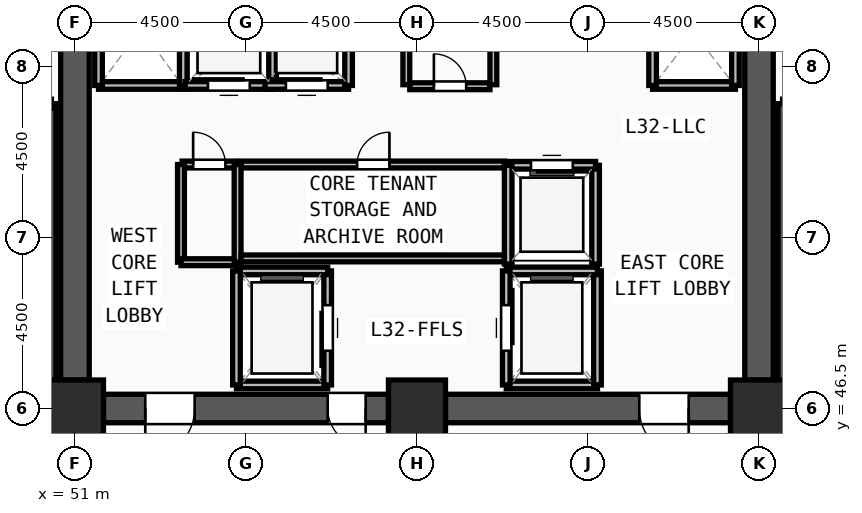
"""IFC4 building model, lengths in metres.
Left out: names, types, materials, properties, quantities, classifications, styles, units other than length and angle.
Written with IfcOpenShell. Run it as: python <this file> out.ifc"""

import sys

from ifc_helpers import new_model, si_unit, direction, frame, frame_2d, origin, origin_2d, place, context, subcontext, project, spatial, rectangle, extrude, source, transform, mapped, element, fill, save


model = new_model("IFC4")
c1 = context("Model", 3, precision=1e-05, world=origin(), true_north=direction((0.0, 1.0)))
c2 = subcontext(c1, "Body", "Model", "MODEL_VIEW")
j1 = project(units=[si_unit("LENGTHUNIT", "METRE"), si_unit("PLANEANGLEUNIT", "RADIAN")], contexts=[c1])
p1 = place(None, origin())
s1 = spatial("IfcSite", under=j1, at=p1, CompositionType="ELEMENT")
p2 = place(p1, origin())
s2 = spatial("IfcBuilding", under=s1, at=p2, CompositionType="ELEMENT")
p3 = place(p2, frame((0.0, 0.0, 124.5)))
s3 = spatial("IfcBuildingStorey", under=s2, at=p3, CompositionType="ELEMENT", Elevation=124.5)
m1 = source(origin(), c2, "Body", "SweptSolid", [
    extrude(rectangle(XDim=1.5, YDim=1.5, at=origin_2d()), origin(), (0.0, 0.0, 1.0), 3.75),
])
for number, where, z_axis, x_axis in (
    (1, (51.0, 46.5, 0.0), (0.0, 0.0, 1.0), (1.0, 0.0, 0.0)),
    (2, (60.0, 46.5, 0.0), (0.0, 0.0, 1.0), (1.0, 0.0, 0.0)),
    (3, (69.0, 46.5, 0.0), (0.0, 0.0, 1.0), (1.0, 0.0, 0.0)),
):
    element("IfcColumn", number, at=place(p3, frame(where, z_axis=z_axis, x_axis=x_axis)), inside=s3, PredefinedType="COLUMN", context=c2, shape_type="MappedRepresentation", body=[
        mapped(m1, transform((0.0, 0.0, 0.0), x_axis=(1.0, 0.0, 0.0), y_axis=(0.0, 1.0, 0.0), z_axis=(0.0, 0.0, 1.0), scale=1.0)),
    ])
p4 = place(p3, frame((69.0, 60.75, 0.0), z_axis=(0.0, 0.0, 1.0), x_axis=(0.0, -1.0, 0.0)))
e4 = element("IfcWall", 4, at=p4, inside=s3, PredefinedType="SHEAR", context=c2, shape_type="SweptSolid", body=[
    extrude(rectangle(XDim=13.5, YDim=0.75, at=frame_2d((6.75, 0.0))), origin(), (0.0, 0.0, 1.0), 3.57),
])
m2 = source(origin(), c2, "Body", "SweptSolid", [
    extrude(rectangle(XDim=1.2, YDim=2.2, at=frame_2d((0.6, 1.1))), frame((0.0, 0.385, 0.0), z_axis=(0.0, -1.0, 0.0), x_axis=(1.0, 0.0, 0.0)), (0.0, 0.0, 1.0), 0.77),
])
p5 = place(p4, frame((1.2, 0.0, 0.0)))
e5 = element("IfcOpeningElement", 5, at=p5, cuts=e4, PredefinedType="OPENING", context=c2, shape_type="MappedRepresentation", body=[
    mapped(m2, transform((0.0, 0.0, 0.0), x_axis=(1.0, 0.0, 0.0), y_axis=(0.0, 1.0, 0.0), z_axis=(0.0, 0.0, 1.0), scale=1.0)),
])
p6 = place(p3, frame((68.25, 46.5, 0.0), z_axis=(0.0, 0.0, 1.0), x_axis=(-1.0, 0.0, 0.0)))
e6 = element("IfcWall", 6, at=p6, inside=s3, PredefinedType="SHEAR", context=c2, shape_type="SweptSolid", body=[
    extrude(rectangle(XDim=7.5, YDim=0.75, at=frame_2d((3.75, 0.0))), origin(), (0.0, 0.0, 1.0), 3.57),
])
m3 = source(origin(), c2, "Body", "SweptSolid", [
    extrude(rectangle(XDim=1.3, YDim=2.2, at=frame_2d((0.65, 1.1))), frame((0.0, 0.385, 0.0), z_axis=(0.0, -1.0, 0.0), x_axis=(1.0, 0.0, 0.0)), (0.0, 0.0, 1.0), 0.77),
])
p7 = place(p6, frame((1.1, 0.0, 0.0)))
e7 = element("IfcOpeningElement", 7, at=p7, cuts=e6, PredefinedType="OPENING", context=c2, shape_type="MappedRepresentation", body=[
    mapped(m3, transform((0.0, 0.0, 0.0), x_axis=(1.0, 0.0, 0.0), y_axis=(0.0, 1.0, 0.0), z_axis=(0.0, 0.0, 1.0), scale=1.0)),
])
p8 = place(p3, frame((59.25, 46.5, 0.0), z_axis=(0.0, 0.0, 1.0), x_axis=(-1.0, 0.0, 0.0)))
e8 = element("IfcWall", 8, at=p8, inside=s3, PredefinedType="SHEAR", context=c2, shape_type="SweptSolid", body=[
    extrude(rectangle(XDim=7.5, YDim=0.75, at=frame_2d((3.75, 0.0))), origin(), (0.0, 0.0, 1.0), 3.57),
])
p9 = place(p8, frame((5.1, 0.0, 0.0)))
e9 = element("IfcOpeningElement", 9, at=p9, cuts=e8, PredefinedType="OPENING", context=c2, shape_type="MappedRepresentation", body=[
    mapped(m3, transform((0.0, 0.0, 0.0), x_axis=(1.0, 0.0, 0.0), y_axis=(0.0, 1.0, 0.0), z_axis=(0.0, 0.0, 1.0), scale=1.0)),
])
m4 = source(origin(), c2, "Body", "SweptSolid", [
    extrude(rectangle(XDim=1.0, YDim=2.2, at=frame_2d((0.5, 1.1))), frame((0.0, 0.385, 0.0), z_axis=(0.0, -1.0, 0.0), x_axis=(1.0, 0.0, 0.0)), (0.0, 0.0, 1.0), 0.77),
])
p10 = place(p8, frame((0.6, 0.0, 0.0)))
e10 = element("IfcOpeningElement", 10, at=p10, cuts=e8, PredefinedType="OPENING", context=c2, shape_type="MappedRepresentation", body=[
    mapped(m4, transform((0.0, 0.0, 0.0), x_axis=(1.0, 0.0, 0.0), y_axis=(0.0, 1.0, 0.0), z_axis=(0.0, 0.0, 1.0), scale=1.0)),
])
p11 = place(p3, frame((51.0, 47.25, 0.0), z_axis=(0.0, 0.0, 1.0), x_axis=(0.0, 1.0, 0.0)))
e11 = element("IfcWall", 11, at=p11, inside=s3, PredefinedType="SHEAR", context=c2, shape_type="SweptSolid", body=[
    extrude(rectangle(XDim=13.5, YDim=0.75, at=frame_2d((6.75, 0.0))), origin(), (0.0, 0.0, 1.0), 3.57),
])
for number, where, z_axis, x_axis in (
    (12, (50.38, 46.7, 0.0), (0.0, 0.0, 1.0), (0.0, 1.0, 0.0)),
    (13, (69.62, 54.52, 0.0), (0.0, 0.0, 1.0), (0.0, -1.0, 0.0)),
):
    element("IfcWall", number, at=place(p3, frame(where, z_axis=z_axis, x_axis=x_axis)), inside=s3, PredefinedType="SOLIDWALL", context=c2, shape_type="SweptSolid", body=[
        extrude(rectangle(XDim=7.82, YDim=0.24, at=frame_2d((3.91, 0.0))), origin(), (0.0, 0.0, 1.0), 3.57),
    ])
p12 = place(p3, frame((55.25, 47.12, 0.0), z_axis=(0.0, 0.0, 1.0), x_axis=(1.0, 0.0, 0.0)))
e14 = element("IfcWall", 14, at=p12, inside=s3, PredefinedType="SOLIDWALL", context=c2, shape_type="SweptSolid", body=[
    extrude(rectangle(XDim=2.4, YDim=0.2, at=frame_2d((1.2, 0.0))), origin(), (0.0, 0.0, 1.0), 3.57),
])
p13 = place(p3, frame((57.65, 47.12, 0.0), z_axis=(0.0, 0.0, 1.0), x_axis=(0.0, 1.0, 0.0)))
e15 = element("IfcWall", 15, at=p13, inside=s3, PredefinedType="SOLIDWALL", context=c2, shape_type="SweptSolid", body=[
    extrude(rectangle(XDim=3.0, YDim=0.2, at=frame_2d((1.5, 0.0))), origin(), (0.0, 0.0, 1.0), 3.57),
])
m5 = source(origin(), c2, "Body", "SweptSolid", [
    extrude(rectangle(XDim=1.2, YDim=2.3, at=frame_2d((0.6, 1.15))), frame((0.0, 0.11, 0.0), z_axis=(0.0, -1.0, 0.0), x_axis=(1.0, 0.0, 0.0)), (0.0, 0.0, 1.0), 0.22),
])
p14 = place(p13, frame((0.9, 0.0, 0.0)))
e16 = element("IfcOpeningElement", 16, at=p14, cuts=e15, PredefinedType="OPENING", context=c2, shape_type="MappedRepresentation", body=[
    mapped(m5, transform((0.0, 0.0, 0.0), x_axis=(1.0, 0.0, 0.0), y_axis=(0.0, 1.0, 0.0), z_axis=(0.0, 0.0, 1.0), scale=1.0)),
])
p15 = place(p3, frame((57.65, 50.12, 0.0), z_axis=(0.0, 0.0, 1.0), x_axis=(-1.0, 0.0, 0.0)))
e17 = element("IfcWall", 17, at=p15, inside=s3, PredefinedType="SOLIDWALL", context=c2, shape_type="SweptSolid", body=[
    extrude(rectangle(XDim=2.4, YDim=0.2, at=frame_2d((1.2, 0.0))), origin(), (0.0, 0.0, 1.0), 3.57),
])
p16 = place(p3, frame((55.25, 50.12, 0.0), z_axis=(0.0, 0.0, 1.0), x_axis=(0.0, -1.0, 0.0)))
e18 = element("IfcWall", 18, at=p16, inside=s3, PredefinedType="SOLIDWALL", context=c2, shape_type="SweptSolid", body=[
    extrude(rectangle(XDim=3.0, YDim=0.2, at=frame_2d((1.5, 0.0))), origin(), (0.0, 0.0, 1.0), 3.57),
])
p17 = place(p3, frame((62.35, 47.12, 0.0), z_axis=(0.0, 0.0, 1.0), x_axis=(1.0, 0.0, 0.0)))
e19 = element("IfcWall", 19, at=p17, inside=s3, PredefinedType="SOLIDWALL", context=c2, shape_type="SweptSolid", body=[
    extrude(rectangle(XDim=2.4, YDim=0.2, at=frame_2d((1.2, 0.0))), origin(), (0.0, 0.0, 1.0), 3.57),
])
p18 = place(p3, frame((64.75, 47.12, 0.0), z_axis=(0.0, 0.0, 1.0), x_axis=(0.0, 1.0, 0.0)))
e20 = element("IfcWall", 20, at=p18, inside=s3, PredefinedType="SOLIDWALL", context=c2, shape_type="SweptSolid", body=[
    extrude(rectangle(XDim=3.0, YDim=0.2, at=frame_2d((1.5, 0.0))), origin(), (0.0, 0.0, 1.0), 3.57),
])
p19 = place(p3, frame((64.75, 50.12, 0.0), z_axis=(0.0, 0.0, 1.0), x_axis=(-1.0, 0.0, 0.0)))
e21 = element("IfcWall", 21, at=p19, inside=s3, PredefinedType="SOLIDWALL", context=c2, shape_type="SweptSolid", body=[
    extrude(rectangle(XDim=2.4, YDim=0.2, at=frame_2d((1.2, 0.0))), origin(), (0.0, 0.0, 1.0), 3.57),
])
p20 = place(p3, frame((62.35, 50.12, 0.0), z_axis=(0.0, 0.0, 1.0), x_axis=(0.0, -1.0, 0.0)))
e22 = element("IfcWall", 22, at=p20, inside=s3, PredefinedType="SOLIDWALL", context=c2, shape_type="SweptSolid", body=[
    extrude(rectangle(XDim=3.0, YDim=0.2, at=frame_2d((1.5, 0.0))), origin(), (0.0, 0.0, 1.0), 3.57),
])
p21 = place(p20, frame((0.9, 0.0, 0.0)))
e23 = element("IfcOpeningElement", 23, at=p21, cuts=e22, PredefinedType="OPENING", context=c2, shape_type="MappedRepresentation", body=[
    mapped(m5, transform((0.0, 0.0, 0.0), x_axis=(1.0, 0.0, 0.0), y_axis=(0.0, 1.0, 0.0), z_axis=(0.0, 0.0, 1.0), scale=1.0)),
])
p22 = place(p3, frame((51.62, 55.0, 0.0), z_axis=(0.0, 0.0, 1.0), x_axis=(1.0, 0.0, 0.0)))
e24 = element("IfcWall", 24, at=p22, inside=s3, PredefinedType="SOLIDWALL", context=c2, shape_type="SweptSolid", body=[
    extrude(rectangle(XDim=2.23, YDim=0.2, at=frame_2d((1.115, 0.0))), origin(), (0.0, 0.0, 1.0), 3.57),
])
for number, where, z_axis, x_axis in (
    (25, (53.85, 55.0, 0.0), (0.0, 0.0, 1.0), (0.0, 1.0, 0.0)),
    (26, (51.62, 58.0, 0.0), (0.0, 0.0, 1.0), (0.0, -1.0, 0.0)),
):
    element("IfcWall", number, at=place(p3, frame(where, z_axis=z_axis, x_axis=x_axis)), inside=s3, PredefinedType="SOLIDWALL", context=c2, shape_type="SweptSolid", body=[
        extrude(rectangle(XDim=3.0, YDim=0.2, at=frame_2d((1.5, 0.0))), origin(), (0.0, 0.0, 1.0), 3.57),
    ])
p23 = place(p3, frame((66.2, 55.0, 0.0), z_axis=(0.0, 0.0, 1.0), x_axis=(1.0, 0.0, 0.0)))
e27 = element("IfcWall", 27, at=p23, inside=s3, PredefinedType="SOLIDWALL", context=c2, shape_type="SweptSolid", body=[
    extrude(rectangle(XDim=2.18, YDim=0.2, at=frame_2d((1.09, 0.0))), origin(), (0.0, 0.0, 1.0), 3.57),
])
for number, where, z_axis, x_axis in (
    (28, (68.38, 55.0, 0.0), (0.0, 0.0, 1.0), (0.0, 1.0, 0.0)),
    (29, (66.2, 57.75, 0.0), (0.0, 0.0, 1.0), (0.0, -1.0, 0.0)),
):
    element("IfcWall", number, at=place(p3, frame(where, z_axis=z_axis, x_axis=x_axis)), inside=s3, PredefinedType="SOLIDWALL", context=c2, shape_type="SweptSolid", body=[
        extrude(rectangle(XDim=2.75, YDim=0.2, at=frame_2d((1.375, 0.0))), origin(), (0.0, 0.0, 1.0), 3.57),
    ])
p24 = place(p3, frame((64.7, 50.3, 0.0), z_axis=(0.0, 0.0, 1.0), x_axis=(0.0, 1.0, 0.0)))
e30 = element("IfcWall", 30, at=p24, inside=s3, PredefinedType="SOLIDWALL", context=c2, shape_type="SweptSolid", body=[
    extrude(rectangle(XDim=2.6, YDim=0.2, at=frame_2d((1.3, 0.0))), origin(), (0.0, 0.0, 1.0), 3.57),
])
p25 = place(p3, frame((64.7, 52.9, 0.0), z_axis=(0.0, 0.0, 1.0), x_axis=(-1.0, 0.0, 0.0)))
e31 = element("IfcWall", 31, at=p25, inside=s3, PredefinedType="SOLIDWALL", context=c2, shape_type="SweptSolid", body=[
    extrude(rectangle(XDim=2.3, YDim=0.2, at=frame_2d((1.15, 0.0))), origin(), (0.0, 0.0, 1.0), 3.57),
])
m6 = source(origin(), c2, "Body", "SweptSolid", [
    extrude(rectangle(XDim=1.1, YDim=2.2, at=frame_2d((0.55, 1.1))), frame((0.0, 0.11, 0.0), z_axis=(0.0, -1.0, 0.0), x_axis=(1.0, 0.0, 0.0)), (0.0, 0.0, 1.0), 0.22),
])
p26 = place(p25, frame((0.6, 0.0, 0.0)))
e32 = element("IfcOpeningElement", 32, at=p26, cuts=e31, PredefinedType="OPENING", context=c2, shape_type="MappedRepresentation", body=[
    mapped(m6, transform((0.0, 0.0, 0.0), x_axis=(1.0, 0.0, 0.0), y_axis=(0.0, 1.0, 0.0), z_axis=(0.0, 0.0, 1.0), scale=1.0)),
])
p27 = place(p3, frame((62.4, 52.9, 0.0), z_axis=(0.0, 0.0, 1.0), x_axis=(0.0, -1.0, 0.0)))
e33 = element("IfcWall", 33, at=p27, inside=s3, PredefinedType="SOLIDWALL", context=c2, shape_type="SweptSolid", body=[
    extrude(rectangle(XDim=2.6, YDim=0.2, at=frame_2d((1.3, 0.0))), origin(), (0.0, 0.0, 1.0), 3.57),
])
p28 = place(p3, frame((53.9, 55.0, 0.0), z_axis=(0.0, 0.0, 1.0), x_axis=(1.0, 0.0, 0.0)))
e34 = element("IfcWall", 34, at=p28, inside=s3, PredefinedType="SOLIDWALL", context=c2, shape_type="SweptSolid", body=[
    extrude(rectangle(XDim=2.3, YDim=0.2, at=frame_2d((1.15, 0.0))), origin(), (0.0, 0.0, 1.0), 3.57),
])
p29 = place(p28, frame((0.6, 0.0, 0.0)))
e35 = element("IfcOpeningElement", 35, at=p29, cuts=e34, PredefinedType="OPENING", context=c2, shape_type="MappedRepresentation", body=[
    mapped(m6, transform((0.0, 0.0, 0.0), x_axis=(1.0, 0.0, 0.0), y_axis=(0.0, 1.0, 0.0), z_axis=(0.0, 0.0, 1.0), scale=1.0)),
])
p30 = place(p3, frame((56.2, 55.0, 0.0), z_axis=(0.0, 0.0, 1.0), x_axis=(0.0, 1.0, 0.0)))
e36 = element("IfcWall", 36, at=p30, inside=s3, PredefinedType="SOLIDWALL", context=c2, shape_type="SweptSolid", body=[
    extrude(rectangle(XDim=2.6, YDim=0.2, at=frame_2d((1.3, 0.0))), origin(), (0.0, 0.0, 1.0), 3.57),
])
p31 = place(p3, frame((56.0, 55.0, 0.0), z_axis=(0.0, 0.0, 1.0), x_axis=(1.0, 0.0, 0.0)))
e37 = element("IfcWall", 37, at=p31, inside=s3, PredefinedType="SOLIDWALL", context=c2, shape_type="SweptSolid", body=[
    extrude(rectangle(XDim=2.2, YDim=0.2, at=frame_2d((1.1, 0.0))), origin(), (0.0, 0.0, 1.0), 3.57),
])
p32 = place(p31, frame((0.55, 0.0, 0.0)))
e38 = element("IfcOpeningElement", 38, at=p32, cuts=e37, PredefinedType="OPENING", context=c2, shape_type="MappedRepresentation", body=[
    mapped(m6, transform((0.0, 0.0, 0.0), x_axis=(1.0, 0.0, 0.0), y_axis=(0.0, 1.0, 0.0), z_axis=(0.0, 0.0, 1.0), scale=1.0)),
])
p33 = place(p3, frame((58.2, 55.0, 0.0), z_axis=(0.0, 0.0, 1.0), x_axis=(0.0, 1.0, 0.0)))
e39 = element("IfcWall", 39, at=p33, inside=s3, PredefinedType="SOLIDWALL", context=c2, shape_type="SweptSolid", body=[
    extrude(rectangle(XDim=2.6, YDim=0.2, at=frame_2d((1.3, 0.0))), origin(), (0.0, 0.0, 1.0), 3.57),
])
p34 = place(p3, frame((55.37, 52.92, 0.0), z_axis=(0.0, 0.0, 1.0), x_axis=(1.0, 0.0, 0.0)))
e40 = element("IfcWall", 40, at=p34, inside=s3, PredefinedType="PARTITIONING", context=c2, shape_type="SweptSolid", body=[
    extrude(rectangle(XDim=6.93, YDim=0.18, at=frame_2d((3.465, 0.0))), origin(), (0.0, 0.0, 1.0), 3.57),
])
m7 = source(origin(), c2, "Body", "SweptSolid", [
    extrude(rectangle(XDim=0.85, YDim=2.1, at=frame_2d((0.425, 1.05))), frame((0.0, 0.1, 0.0), z_axis=(0.0, -1.0, 0.0), x_axis=(1.0, 0.0, 0.0)), (0.0, 0.0, 1.0), 0.2),
])
p35 = place(p34, frame((3.055, 0.0, 0.0)))
e41 = element("IfcOpeningElement", 41, at=p35, cuts=e40, PredefinedType="OPENING", context=c2, shape_type="MappedRepresentation", body=[
    mapped(m7, transform((0.0, 0.0, 0.0), x_axis=(1.0, 0.0, 0.0), y_axis=(0.0, 1.0, 0.0), z_axis=(0.0, 0.0, 1.0), scale=1.0)),
])
p36 = place(p3, frame((59.81, 54.98, 0.0), z_axis=(0.0, 0.0, 1.0), x_axis=(1.0, 0.0, 0.0)))
e42 = element("IfcWall", 42, at=p36, inside=s3, PredefinedType="PARTITIONING", context=c2, shape_type="SweptSolid", body=[
    extrude(rectangle(XDim=2.11, YDim=0.18, at=frame_2d((1.055, 0.0))), origin(), (0.0, 0.0, 1.0), 3.57),
])
p37 = place(p36, frame((0.635, 0.0, 0.0)))
e43 = element("IfcOpeningElement", 43, at=p37, cuts=e42, PredefinedType="OPENING", context=c2, shape_type="MappedRepresentation", body=[
    mapped(m7, transform((0.0, 0.0, 0.0), x_axis=(1.0, 0.0, 0.0), y_axis=(0.0, 1.0, 0.0), z_axis=(0.0, 0.0, 1.0), scale=1.0)),
])
p38 = place(p3, frame((53.82, 52.92, 0.0), z_axis=(0.0, 0.0, 1.0), x_axis=(1.0, 0.0, 0.0)))
e44 = element("IfcWall", 44, at=p38, inside=s3, PredefinedType="PARTITIONING", context=c2, shape_type="SweptSolid", body=[
    extrude(rectangle(XDim=1.43, YDim=0.18, at=frame_2d((0.715, 0.0))), origin(), (0.0, 0.0, 1.0), 3.57),
])
p39 = place(p38, frame((0.29, 0.0, 0.0)))
e45 = element("IfcOpeningElement", 45, at=p39, cuts=e44, PredefinedType="OPENING", context=c2, shape_type="MappedRepresentation", body=[
    mapped(m7, transform((0.0, 0.0, 0.0), x_axis=(1.0, 0.0, 0.0), y_axis=(0.0, 1.0, 0.0), z_axis=(0.0, 0.0, 1.0), scale=1.0)),
])
for number, where, z_axis, x_axis in (
    (46, (59.72, 55.02, 0.0), (0.0, 0.0, 1.0), (0.0, 1.0, 0.0)),
    (47, (62.01, 55.02, 0.0), (0.0, 0.0, 1.0), (0.0, 1.0, 0.0)),
):
    element("IfcWall", number, at=place(p3, frame(where, z_axis=z_axis, x_axis=x_axis)), inside=s3, PredefinedType="PARTITIONING", context=c2, shape_type="SweptSolid", body=[
        extrude(rectangle(XDim=2.88, YDim=0.18, at=frame_2d((1.44, 0.0))), origin(), (0.0, 0.0, 1.0), 3.57),
    ])
p40 = place(p3, frame((53.79, 50.35, 0.0), z_axis=(0.0, 0.0, 1.0), x_axis=(0.0, 1.0, 0.0)))
e48 = element("IfcWall", 48, at=p40, inside=s3, PredefinedType="PARTITIONING", context=c2, shape_type="SweptSolid", body=[
    extrude(rectangle(XDim=2.57, YDim=0.18, at=frame_2d((1.285, 0.0))), origin(), (0.0, 0.0, 1.0), 3.57),
])
p41 = place(p3, frame((53.79, 50.35, 0.0), z_axis=(0.0, 0.0, 1.0), x_axis=(1.0, 0.0, 0.0)))
e49 = element("IfcWall", 49, at=p41, inside=s3, PredefinedType="PARTITIONING", context=c2, shape_type="SweptSolid", body=[
    extrude(rectangle(XDim=1.49, YDim=0.18, at=frame_2d((0.745, 0.0))), origin(), (0.0, 0.0, 1.0), 3.57),
])
p42 = place(p3, frame((55.28, 50.35, 0.0), z_axis=(0.0, 0.0, 1.0), x_axis=(0.0, 1.0, 0.0)))
e50 = element("IfcWall", 50, at=p42, inside=s3, PredefinedType="PARTITIONING", context=c2, shape_type="SweptSolid", body=[
    extrude(rectangle(XDim=2.57, YDim=0.18, at=frame_2d((1.285, 0.0))), origin(), (0.0, 0.0, 1.0), 3.57),
])
p43 = place(p3, frame((55.37, 50.45, 0.0), z_axis=(0.0, 0.0, 1.0), x_axis=(1.0, 0.0, 0.0)))
e51 = element("IfcWall", 51, at=p43, inside=s3, PredefinedType="PARTITIONING", context=c2, shape_type="SweptSolid", body=[
    extrude(rectangle(XDim=6.93, YDim=0.18, at=frame_2d((3.465, 0.0))), origin(), (0.0, 0.0, 1.0), 3.57),
])
m8 = source(origin(), c2, "Body", "SweptSolid", [
    extrude(rectangle(XDim=1.3, YDim=2.2, at=frame_2d((0.65, 1.1))), frame((0.0, 0.025, 0.0), z_axis=(0.0, -1.0, 0.0), x_axis=(1.0, 0.0, 0.0)), (0.0, 0.0, 1.0), 0.05),
])
p44 = place(p9, origin())
e52 = element("IfcDoor", 52, at=p44, inside=s3, OperationType="SINGLE_SWING_RIGHT", PredefinedType="DOOR", context=c2, shape_type="MappedRepresentation", body=[
    mapped(m8, transform((0.0, 0.0, 0.0), x_axis=(1.0, 0.0, 0.0), y_axis=(0.0, 1.0, 0.0), z_axis=(0.0, 0.0, 1.0), scale=1.0)),
])
fill(e9, e52)
m9 = source(origin(), c2, "Body", "SweptSolid", [
    extrude(rectangle(XDim=1.0, YDim=2.2, at=frame_2d((0.5, 1.1))), frame((0.0, 0.025, 0.0), z_axis=(0.0, -1.0, 0.0), x_axis=(1.0, 0.0, 0.0)), (0.0, 0.0, 1.0), 0.05),
])
p45 = place(p10, origin())
e53 = element("IfcDoor", 53, at=p45, inside=s3, OperationType="SINGLE_SWING_LEFT", PredefinedType="DOOR", context=c2, shape_type="MappedRepresentation", body=[
    mapped(m9, transform((0.0, 0.0, 0.0), x_axis=(1.0, 0.0, 0.0), y_axis=(0.0, 1.0, 0.0), z_axis=(0.0, 0.0, 1.0), scale=1.0)),
])
fill(e10, e53)
p46 = place(p7, origin())
e54 = element("IfcDoor", 54, at=p46, inside=s3, OperationType="SINGLE_SWING_LEFT", PredefinedType="DOOR", context=c2, shape_type="MappedRepresentation", body=[
    mapped(m8, transform((0.0, 0.0, 0.0), x_axis=(1.0, 0.0, 0.0), y_axis=(0.0, 1.0, 0.0), z_axis=(0.0, 0.0, 1.0), scale=1.0)),
])
fill(e7, e54)
m10 = source(origin(), c2, "Body", "SweptSolid", [
    extrude(rectangle(XDim=1.2, YDim=2.3, at=frame_2d((0.6, 1.15))), frame((0.0, 0.025, 0.0), z_axis=(0.0, -1.0, 0.0), x_axis=(1.0, 0.0, 0.0)), (0.0, 0.0, 1.0), 0.05),
])
p47 = place(p14, origin())
e55 = element("IfcDoor", 55, at=p47, inside=s3, OperationType="SLIDING_TO_LEFT", PredefinedType="DOOR", context=c2, shape_type="MappedRepresentation", body=[
    mapped(m10, transform((0.0, 0.0, 0.0), x_axis=(1.0, 0.0, 0.0), y_axis=(0.0, 1.0, 0.0), z_axis=(0.0, 0.0, 1.0), scale=1.0)),
])
fill(e16, e55)
p48 = place(p21, origin())
e56 = element("IfcDoor", 56, at=p48, inside=s3, OperationType="SLIDING_TO_LEFT", PredefinedType="DOOR", context=c2, shape_type="MappedRepresentation", body=[
    mapped(m10, transform((0.0, 0.0, 0.0), x_axis=(1.0, 0.0, 0.0), y_axis=(0.0, 1.0, 0.0), z_axis=(0.0, 0.0, 1.0), scale=1.0)),
])
fill(e23, e56)
m11 = source(origin(), c2, "Body", "SweptSolid", [
    extrude(rectangle(XDim=1.1, YDim=2.2, at=frame_2d((0.55, 1.1))), frame((0.0, 0.025, 0.0), z_axis=(0.0, -1.0, 0.0), x_axis=(1.0, 0.0, 0.0)), (0.0, 0.0, 1.0), 0.05),
])
p49 = place(p26, origin())
e57 = element("IfcDoor", 57, at=p49, inside=s3, OperationType="SLIDING_TO_LEFT", PredefinedType="DOOR", context=c2, shape_type="MappedRepresentation", body=[
    mapped(m11, transform((0.0, 0.0, 0.0), x_axis=(1.0, 0.0, 0.0), y_axis=(0.0, 1.0, 0.0), z_axis=(0.0, 0.0, 1.0), scale=1.0)),
])
fill(e32, e57)
p50 = place(p29, origin())
e58 = element("IfcDoor", 58, at=p50, inside=s3, OperationType="SLIDING_TO_LEFT", PredefinedType="DOOR", context=c2, shape_type="MappedRepresentation", body=[
    mapped(m11, transform((0.0, 0.0, 0.0), x_axis=(1.0, 0.0, 0.0), y_axis=(0.0, 1.0, 0.0), z_axis=(0.0, 0.0, 1.0), scale=1.0)),
])
fill(e35, e58)
p51 = place(p32, origin())
e59 = element("IfcDoor", 59, at=p51, inside=s3, OperationType="SLIDING_TO_LEFT", PredefinedType="DOOR", context=c2, shape_type="MappedRepresentation", body=[
    mapped(m11, transform((0.0, 0.0, 0.0), x_axis=(1.0, 0.0, 0.0), y_axis=(0.0, 1.0, 0.0), z_axis=(0.0, 0.0, 1.0), scale=1.0)),
])
fill(e38, e59)
m12 = source(origin(), c2, "Body", "SweptSolid", [
    extrude(rectangle(XDim=0.85, YDim=2.1, at=frame_2d((0.425, 1.05))), frame((0.0, 0.025, 0.0), z_axis=(0.0, -1.0, 0.0), x_axis=(1.0, 0.0, 0.0)), (0.0, 0.0, 1.0), 0.05),
])
p52 = place(p35, origin())
e60 = element("IfcDoor", 60, at=p52, inside=s3, OperationType="SINGLE_SWING_RIGHT", PredefinedType="DOOR", context=c2, shape_type="MappedRepresentation", body=[
    mapped(m12, transform((0.0, 0.0, 0.0), x_axis=(1.0, 0.0, 0.0), y_axis=(0.0, 1.0, 0.0), z_axis=(0.0, 0.0, 1.0), scale=1.0)),
])
fill(e41, e60)
p53 = place(p37, origin())
e61 = element("IfcDoor", 61, at=p53, inside=s3, OperationType="SINGLE_SWING_LEFT", PredefinedType="DOOR", context=c2, shape_type="MappedRepresentation", body=[
    mapped(m12, transform((0.0, 0.0, 0.0), x_axis=(1.0, 0.0, 0.0), y_axis=(0.0, 1.0, 0.0), z_axis=(0.0, 0.0, 1.0), scale=1.0)),
])
fill(e43, e61)
p54 = place(p39, origin())
e62 = element("IfcDoor", 62, at=p54, inside=s3, OperationType="SINGLE_SWING_LEFT", PredefinedType="DOOR", context=c2, shape_type="MappedRepresentation", body=[
    mapped(m12, transform((0.0, 0.0, 0.0), x_axis=(1.0, 0.0, 0.0), y_axis=(0.0, 1.0, 0.0), z_axis=(0.0, 0.0, 1.0), scale=1.0)),
])
fill(e45, e62)
save(model, sys.argv[1])
